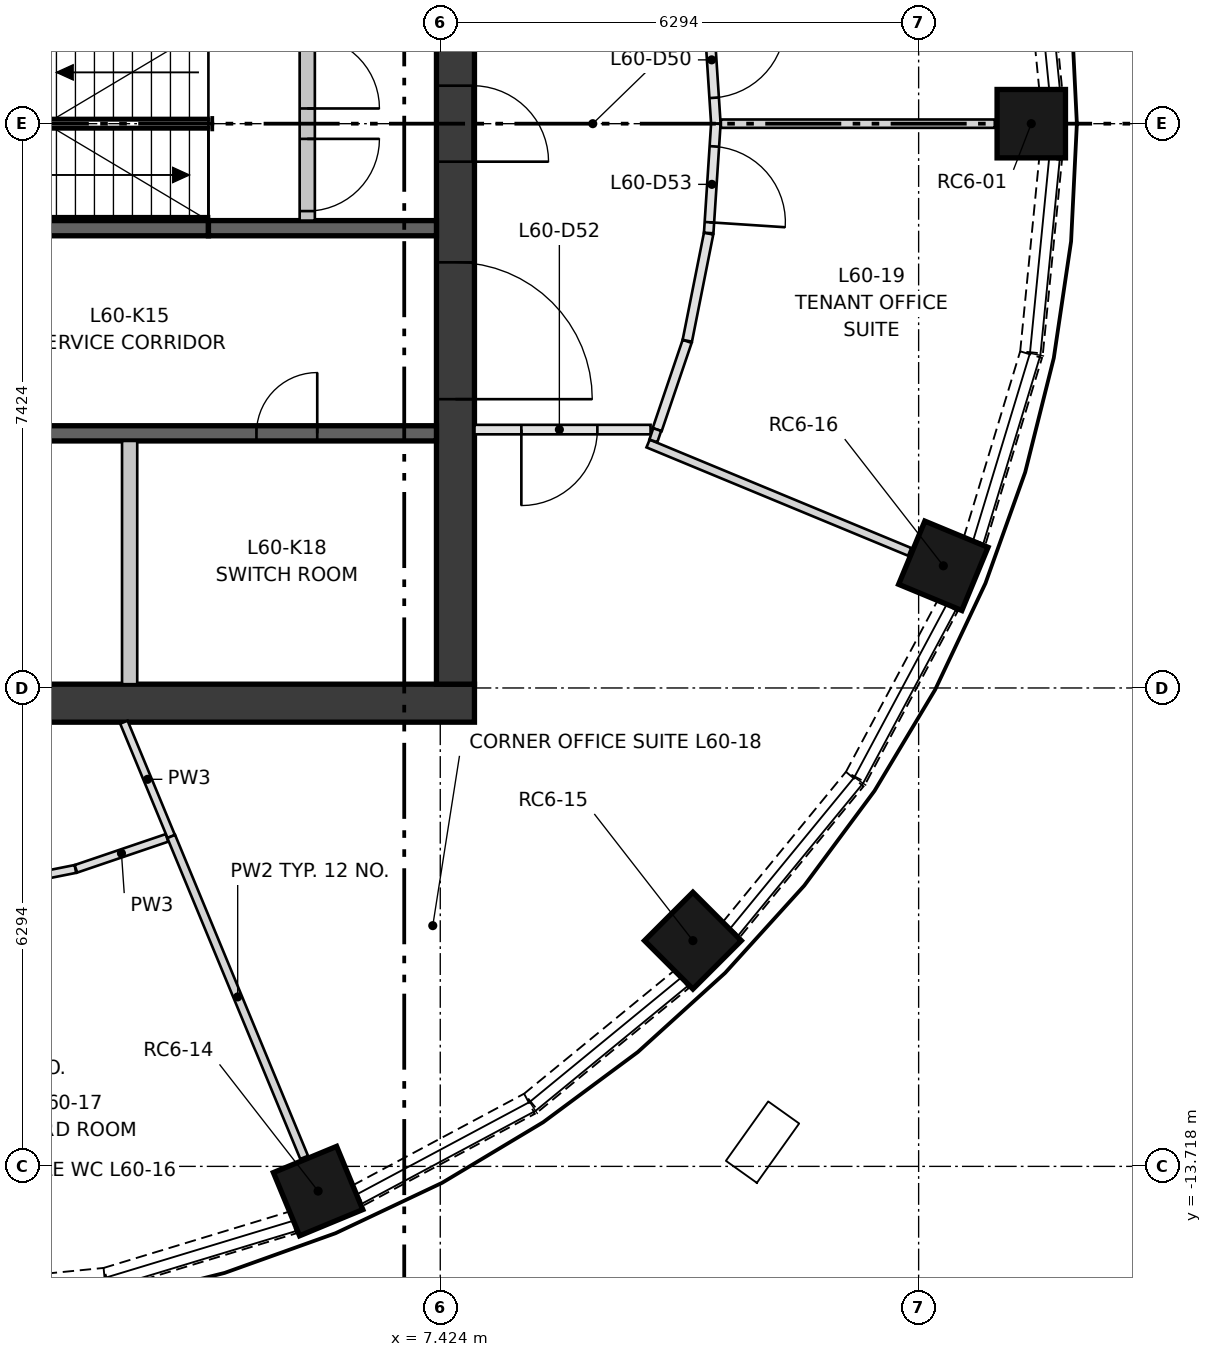
"""IFC4 building model, lengths in metres.
Left out: names, types, materials, properties, quantities, classifications, styles, units other than length and angle.
Written with IfcOpenShell. Run it as: python <this file> out.ifc"""

import sys

from ifc_helpers import new_model, si_unit, direction, frame, frame_2d, origin, origin_2d, place, context, subcontext, project, spatial, rectangle, extrude, element, fill, save


model = new_model("IFC4")
c1 = context("Model", 3, precision=1e-05, world=origin(), true_north=direction((0.0, 1.0)))
c2 = subcontext(c1, "Body", "Model", "MODEL_VIEW")
j1 = project(units=[si_unit("LENGTHUNIT", "METRE"), si_unit("PLANEANGLEUNIT", "RADIAN")], contexts=[c1])
p1 = place(None, origin())
s1 = spatial("IfcSite", under=j1, at=p1, CompositionType="ELEMENT")
p2 = place(p1, origin())
s2 = spatial("IfcBuilding", under=s1, at=p2, CompositionType="ELEMENT")
p3 = place(p2, frame((0.0, 0.0, 221.15)))
s3 = spatial("IfcBuildingStorey", under=s2, at=p3, CompositionType="ELEMENT", Elevation=221.15)
for number, where, z_axis, x_axis in (
    (1, (15.2, 0.0, 0.0), (0.0, 0.0, 1.0), (1.0, 0.0, 0.0)),
    (2, (5.817, -14.043, 0.0), (0.0, 0.0, 1.0), (0.383, -0.924, 0.0)),
    (3, (10.748, -10.748, 0.0), (0.0, 0.0, 1.0), (0.707, -0.707, 0.0)),
    (4, (14.043, -5.817, 0.0), (0.0, 0.0, 1.0), (0.924, -0.383, 0.0)),
):
    element("IfcColumn", number, at=place(p3, frame(where, z_axis=z_axis, x_axis=x_axis)), inside=s3, PredefinedType="COLUMN", context=c2, shape_type="SweptSolid", body=[
        extrude(rectangle(XDim=0.9, YDim=0.9, at=origin_2d()), origin(), (0.0, 0.0, 1.0), 2.85),
    ])
p4 = place(p3, frame((-7.874, -7.624, 0.0), z_axis=(0.0, 0.0, 1.0), x_axis=(1.0, 0.0, 0.0)))
e5 = element("IfcWall", 5, at=p4, inside=s3, PredefinedType="SHEAR", context=c2, shape_type="SweptSolid", body=[
    extrude(rectangle(XDim=15.748, YDim=0.5, at=frame_2d((7.874, 0.0))), origin(), (0.0, 0.0, 1.0), 3.35),
])
p5 = place(p3, frame((7.624, -7.374, 0.0), z_axis=(0.0, 0.0, 1.0), x_axis=(0.0, 1.0, 0.0)))
e6 = element("IfcWall", 6, at=p5, inside=s3, PredefinedType="SHEAR", context=c2, shape_type="SweptSolid", body=[
    extrude(rectangle(XDim=14.748, YDim=0.5, at=frame_2d((7.374, 0.0))), origin(), (0.0, 0.0, 1.0), 3.35),
])
p6 = place(p5, frame((6.874, 0.0, 0.0)))
e7 = element("IfcOpeningElement", 7, at=p6, cuts=e6, PredefinedType="OPENING", context=c2, shape_type="SweptSolid", body=[
    extrude(rectangle(XDim=1.0, YDim=2.1, at=frame_2d((0.5, 1.05))), frame((0.0, 0.26, 0.0), z_axis=(0.0, -1.0, 0.0), x_axis=(1.0, 0.0, 0.0)), (0.0, 0.0, 1.0), 0.52),
])
p7 = place(p5, frame((3.75, 0.0, 0.0)))
e8 = element("IfcOpeningElement", 8, at=p7, cuts=e6, PredefinedType="OPENING", context=c2, shape_type="SweptSolid", body=[
    extrude(rectangle(XDim=1.8, YDim=2.1, at=frame_2d((0.9, 1.05))), frame((0.0, 0.26, 0.0), z_axis=(0.0, -1.0, 0.0), x_axis=(1.0, 0.0, 0.0)), (0.0, 0.0, 1.0), 0.52),
])
p8 = place(p5, frame((9.198, 0.0, 0.0)))
e9 = element("IfcOpeningElement", 9, at=p8, cuts=e6, PredefinedType="OPENING", context=c2, shape_type="SweptSolid", body=[
    extrude(rectangle(XDim=1.8, YDim=2.1, at=frame_2d((0.9, 1.05))), frame((0.0, 0.26, 0.0), z_axis=(0.0, -1.0, 0.0), x_axis=(1.0, 0.0, 0.0)), (0.0, 0.0, 1.0), 0.52),
])
p9 = place(p3, frame((-7.374, -4.074, 0.0), z_axis=(0.0, 0.0, 1.0), x_axis=(1.0, 0.0, 0.0)))
e10 = element("IfcWall", 10, at=p9, inside=s3, PredefinedType="SHEAR", context=c2, shape_type="SweptSolid", body=[
    extrude(rectangle(XDim=14.748, YDim=0.2, at=frame_2d((7.374, 0.0))), origin(), (0.0, 0.0, 1.0), 3.0),
])
p10 = place(p9, frame((1.319, 0.0, 0.0)))
e11 = element("IfcOpeningElement", 11, at=p10, cuts=e10, PredefinedType="OPENING", context=c2, shape_type="SweptSolid", body=[
    extrude(rectangle(XDim=1.1, YDim=2.1, at=frame_2d((0.55, 1.05))), frame((0.0, 0.11, 0.0), z_axis=(0.0, -1.0, 0.0), x_axis=(1.0, 0.0, 0.0)), (0.0, 0.0, 1.0), 0.22),
])
p11 = place(p9, frame((4.456, 0.0, 0.0)))
e12 = element("IfcOpeningElement", 12, at=p11, cuts=e10, PredefinedType="OPENING", context=c2, shape_type="SweptSolid", body=[
    extrude(rectangle(XDim=1.1, YDim=2.1, at=frame_2d((0.55, 1.05))), frame((0.0, 0.11, 0.0), z_axis=(0.0, -1.0, 0.0), x_axis=(1.0, 0.0, 0.0)), (0.0, 0.0, 1.0), 0.22),
])
p12 = place(p9, frame((8.143, 0.0, 0.0)))
e13 = element("IfcOpeningElement", 13, at=p12, cuts=e10, PredefinedType="OPENING", context=c2, shape_type="SweptSolid", body=[
    extrude(rectangle(XDim=1.0, YDim=2.1, at=frame_2d((0.5, 1.05))), frame((0.0, 0.11, 0.0), z_axis=(0.0, -1.0, 0.0), x_axis=(1.0, 0.0, 0.0)), (0.0, 0.0, 1.0), 0.22),
])
p13 = place(p9, frame((12.379, 0.0, 0.0)))
e14 = element("IfcOpeningElement", 14, at=p13, cuts=e10, PredefinedType="OPENING", context=c2, shape_type="SweptSolid", body=[
    extrude(rectangle(XDim=0.8, YDim=2.1, at=frame_2d((0.4, 1.05))), frame((0.0, 0.11, 0.0), z_axis=(0.0, -1.0, 0.0), x_axis=(1.0, 0.0, 0.0)), (0.0, 0.0, 1.0), 0.22),
])
p14 = place(p3, frame((0.0, -1.375, 0.0), z_axis=(0.0, 0.0, 1.0), x_axis=(1.0, 0.0, 0.0)))
e15 = element("IfcWall", 15, at=p14, inside=s3, PredefinedType="SHEAR", context=c2, shape_type="SweptSolid", body=[
    extrude(rectangle(XDim=4.374, YDim=0.2, at=frame_2d((2.187, 0.0))), origin(), (0.0, 0.0, 1.0), 3.0),
])
p15 = place(p3, frame((4.374, -1.375, 0.0), z_axis=(0.0, 0.0, 1.0), x_axis=(1.0, 0.0, 0.0)))
e16 = element("IfcWall", 16, at=p15, inside=s3, PredefinedType="SHEAR", context=c2, shape_type="SweptSolid", body=[
    extrude(rectangle(XDim=3.0, YDim=0.2, at=frame_2d((1.5, 0.0))), origin(), (0.0, 0.0, 1.0), 3.0),
])
p16 = place(p3, frame((3.337, -7.374, 0.0), z_axis=(0.0, 0.0, 1.0), x_axis=(0.0, 1.0, 0.0)))
e17 = element("IfcWall", 17, at=p16, inside=s3, PredefinedType="PARTITIONING", context=c2, shape_type="SweptSolid", body=[
    extrude(rectangle(XDim=3.2, YDim=0.2, at=frame_2d((1.6, 0.0))), origin(), (0.0, 0.0, 1.0), 3.0),
])
p17 = place(p3, frame((5.674, -1.275, 0.0), z_axis=(0.0, 0.0, 1.0), x_axis=(0.0, 1.0, 0.0)))
e18 = element("IfcWall", 18, at=p17, inside=s3, PredefinedType="PARTITIONING", context=c2, shape_type="SweptSolid", body=[
    extrude(rectangle(XDim=2.55, YDim=0.2, at=frame_2d((1.275, 0.0))), origin(), (0.0, 0.0, 1.0), 3.0),
])
p18 = place(p17, frame((0.125, 0.0, 0.0)))
e19 = element("IfcOpeningElement", 19, at=p18, cuts=e18, PredefinedType="OPENING", context=c2, shape_type="SweptSolid", body=[
    extrude(rectangle(XDim=0.95, YDim=2.1, at=frame_2d((0.475, 1.05))), frame((0.0, 0.11, 0.0), z_axis=(0.0, -1.0, 0.0), x_axis=(1.0, 0.0, 0.0)), (0.0, 0.0, 1.0), 0.22),
])
p19 = place(p17, frame((1.475, 0.0, 0.0)))
e20 = element("IfcOpeningElement", 20, at=p19, cuts=e18, PredefinedType="OPENING", context=c2, shape_type="SweptSolid", body=[
    extrude(rectangle(XDim=0.95, YDim=2.1, at=frame_2d((0.475, 1.05))), frame((0.0, 0.11, 0.0), z_axis=(0.0, -1.0, 0.0), x_axis=(1.0, 0.0, 0.0)), (0.0, 0.0, 1.0), 0.22),
])
for number, where, z_axis, x_axis in (
    (21, (15.455, 0.464, 0.0), (0.0, 0.0, 1.0), (-0.098, 0.995, 0.0)),
    (22, (0.464, -15.455, 0.0), (0.0, 0.0, 1.0), (0.995, 0.098, 0.0)),
):
    element("IfcWall", number, at=place(p3, frame(where, z_axis=z_axis, x_axis=x_axis)), inside=s3, PredefinedType="SOLIDWALL", context=c2, shape_type="SweptSolid", body=[
        extrude(rectangle(XDim=2.558, YDim=0.3, at=frame_2d((1.279, 0.0))), origin(), (0.0, 0.0, 1.0), 0.9),
    ])
p20 = place(p3, frame((3.038, -15.198, 0.0), z_axis=(0.0, 0.0, 1.0), x_axis=(0.956960147557, 0.290219358397, 0.0)))
e23 = element("IfcWall", 23, at=p20, inside=s3, PredefinedType="SOLIDWALL", context=c2, shape_type="SweptSolid", body=[
    extrude(rectangle(XDim=2.557, YDim=0.3, at=frame_2d((1.279, 0.0))), origin(), (0.0, 0.0, 1.0), 0.9),
])
p21 = place(p3, frame((6.343, -14.1, 0.0), z_axis=(0.0, 0.0, 1.0), x_axis=(0.881810499649, 0.471603904468, 0.0)))
e24 = element("IfcWall", 24, at=p21, inside=s3, PredefinedType="SOLIDWALL", context=c2, shape_type="SweptSolid", body=[
    extrude(rectangle(XDim=2.557, YDim=0.3, at=frame_2d((1.278, 0.0))), origin(), (0.0, 0.0, 1.0), 0.9),
])
for number, where, z_axis, x_axis in (
    (25, (8.623, -12.877, 0.0), (0.0, 0.0, 1.0), (0.773, 0.634, 0.0)),
    (26, (11.256, -10.6, 0.0), (0.0, 0.0, 1.0), (0.634, 0.773, 0.0)),
):
    element("IfcWall", number, at=place(p3, frame(where, z_axis=z_axis, x_axis=x_axis)), inside=s3, PredefinedType="SOLIDWALL", context=c2, shape_type="SweptSolid", body=[
        extrude(rectangle(XDim=2.558, YDim=0.3, at=frame_2d((1.279, 0.0))), origin(), (0.0, 0.0, 1.0), 0.9),
    ])
p22 = place(p3, frame((12.894, -8.598, 0.0), z_axis=(0.0, 0.0, 1.0), x_axis=(0.471603904468, 0.881810499649, 0.0)))
e27 = element("IfcWall", 27, at=p22, inside=s3, PredefinedType="SOLIDWALL", context=c2, shape_type="SweptSolid", body=[
    extrude(rectangle(XDim=2.557, YDim=0.3, at=frame_2d((1.278, 0.0))), origin(), (0.0, 0.0, 1.0), 0.9),
])
p23 = place(p3, frame((14.455, -5.486, 0.0), z_axis=(0.0, 0.0, 1.0), x_axis=(0.290219358397, 0.956960147557, 0.0)))
e28 = element("IfcWall", 28, at=p23, inside=s3, PredefinedType="SOLIDWALL", context=c2, shape_type="SweptSolid", body=[
    extrude(rectangle(XDim=2.557, YDim=0.3, at=frame_2d((1.279, 0.0))), origin(), (0.0, 0.0, 1.0), 0.9),
])
p24 = place(p3, frame((15.204, -3.009, 0.0), z_axis=(0.0, 0.0, 1.0), x_axis=(0.09813315545, 0.995173293352, 0.0)))
e29 = element("IfcWall", 29, at=p24, inside=s3, PredefinedType="SOLIDWALL", context=c2, shape_type="SweptSolid", body=[
    extrude(rectangle(XDim=2.558, YDim=0.3, at=frame_2d((1.279, 0.0))), origin(), (0.0, 0.0, 1.0), 0.9),
])
p25 = place(p3, frame((10.956, 1.438, 0.0), z_axis=(0.0, 0.0, 1.0), x_axis=(0.065383473363, -0.997860211358, 0.0)))
e30 = element("IfcWall", 30, at=p25, inside=s3, PredefinedType="PARTITIONING", context=c2, shape_type="SweptSolid", body=[
    extrude(rectangle(XDim=1.441, YDim=0.125, at=frame_2d((0.721, 0.0))), origin(), (0.0, 0.0, 1.0), 3.0),
])
p26 = place(p25, frame((0.1, 0.0, 0.0)))
e31 = element("IfcOpeningElement", 31, at=p26, cuts=e30, PredefinedType="OPENING", context=c2, shape_type="SweptSolid", body=[
    extrude(rectangle(XDim=1.0, YDim=2.1, at=frame_2d((0.5, 1.05))), frame((0.0, 0.073, 0.0), z_axis=(0.0, -1.0, 0.0), x_axis=(1.0, 0.0, 0.0)), (0.0, 0.0, 1.0), 0.145),
])
p27 = place(p3, frame((10.191, -4.024, 0.0), z_axis=(0.0, 0.0, 1.0), x_axis=(-1.0, 0.0, 0.0)))
e32 = element("IfcWall", 32, at=p27, inside=s3, PredefinedType="PARTITIONING", context=c2, shape_type="SweptSolid", body=[
    extrude(rectangle(XDim=2.317, YDim=0.125, at=frame_2d((1.158, 0.0))), origin(), (0.0, 0.0, 1.0), 3.0),
])
p28 = place(p27, frame((0.7, 0.0, 0.0)))
e33 = element("IfcOpeningElement", 33, at=p28, cuts=e32, PredefinedType="OPENING", context=c2, shape_type="SweptSolid", body=[
    extrude(rectangle(XDim=1.0, YDim=2.1, at=frame_2d((0.5, 1.05))), frame((0.0, 0.073, 0.0), z_axis=(0.0, -1.0, 0.0), x_axis=(1.0, 0.0, 0.0)), (0.0, 0.0, 1.0), 0.145),
])
p29 = place(p3, frame((10.672, -2.864, 0.0), z_axis=(0.0, 0.0, 1.0), x_axis=(-0.321363343769, -0.946955965862, 0.0)))
e34 = element("IfcWall", 34, at=p29, inside=s3, PredefinedType="PARTITIONING", context=c2, shape_type="SweptSolid", body=[
    extrude(rectangle(XDim=1.225, YDim=0.125, at=frame_2d((0.613, 0.0))), origin(), (0.0, 0.0, 1.0), 3.0),
])
p30 = place(p3, frame((10.955, -1.446, 0.0), z_axis=(0.0, 0.0, 1.0), x_axis=(-0.195005351681, -0.980802178228, 0.0)))
e35 = element("IfcWall", 35, at=p30, inside=s3, PredefinedType="PARTITIONING", context=c2, shape_type="SweptSolid", body=[
    extrude(rectangle(XDim=1.437, YDim=0.125, at=frame_2d((0.719, 0.0))), origin(), (0.0, 0.0, 1.0), 3.0),
])
p31 = place(p3, frame((11.05, 0.0, 0.0), z_axis=(0.0, 0.0, 1.0), x_axis=(-0.065383473363, -0.997860211358, 0.0)))
e36 = element("IfcWall", 36, at=p31, inside=s3, PredefinedType="PARTITIONING", context=c2, shape_type="SweptSolid", body=[
    extrude(rectangle(XDim=1.441, YDim=0.125, at=frame_2d((0.721, 0.0))), origin(), (0.0, 0.0, 1.0), 3.0),
])
p32 = place(p31, frame((0.3, 0.0, 0.0)))
e37 = element("IfcOpeningElement", 37, at=p32, cuts=e36, PredefinedType="OPENING", context=c2, shape_type="SweptSolid", body=[
    extrude(rectangle(XDim=1.0, YDim=2.1, at=frame_2d((0.5, 1.05))), frame((0.0, 0.073, 0.0), z_axis=(0.0, -1.0, 0.0), x_axis=(1.0, 0.0, 0.0)), (0.0, 0.0, 1.0), 0.145),
])
p33 = place(p3, frame((14.72, 0.0, 0.0), z_axis=(0.0, 0.0, 1.0), x_axis=(-1.0, 0.0, 0.0)))
e38 = element("IfcWall", 38, at=p33, inside=s3, PredefinedType="PARTITIONING", context=c2, shape_type="SweptSolid", body=[
    extrude(rectangle(XDim=3.604, YDim=0.11, at=frame_2d((1.802, 0.0))), origin(), (0.0, 0.0, 1.0), 3.0),
])
p34 = place(p3, frame((2.624, -9.805, 0.0), z_axis=(0.0, 0.0, 1.0), x_axis=(-0.980765080918, -0.195191844223, 0.0)))
e39 = element("IfcWall", 39, at=p34, inside=s3, PredefinedType="PARTITIONING", context=c2, shape_type="SweptSolid", body=[
    extrude(rectangle(XDim=1.321, YDim=0.105, at=frame_2d((0.66, 0.0))), origin(), (0.0, 0.0, 1.0), 3.0),
])
p35 = place(p3, frame((3.829, -9.396, 0.0), z_axis=(0.0, 0.0, 1.0), x_axis=(-0.946932566751, -0.321432285291, 0.0)))
e40 = element("IfcWall", 40, at=p35, inside=s3, PredefinedType="PARTITIONING", context=c2, shape_type="SweptSolid", body=[
    extrude(rectangle(XDim=1.265, YDim=0.105, at=frame_2d((0.633, 0.0))), origin(), (0.0, 0.0, 1.0), 3.0),
])
p36 = place(p3, frame((3.261, -7.874, 0.0), z_axis=(0.0, 0.0, 1.0), x_axis=(0.382718376354, -0.923865057463, 0.0)))
e41 = element("IfcWall", 41, at=p36, inside=s3, PredefinedType="PARTITIONING", context=c2, shape_type="SweptSolid", body=[
    extrude(rectangle(XDim=1.627, YDim=0.105, at=frame_2d((0.813, 0.0))), origin(), (0.0, 0.0, 1.0), 3.0),
])
p37 = place(p3, frame((3.884, -9.377, 0.0), z_axis=(0.0, 0.0, 1.0), x_axis=(0.382664766489, -0.923887263949, 0.0)))
e42 = element("IfcWall", 42, at=p37, inside=s3, PredefinedType="PARTITIONING", context=c2, shape_type="SweptSolid", body=[
    extrude(rectangle(XDim=4.57, YDim=0.11, at=frame_2d((2.285, 0.0))), origin(), (0.0, 0.0, 1.0), 3.0),
])
p38 = place(p3, frame((10.158, -4.208, 0.0), z_axis=(0.0, 0.0, 1.0), x_axis=(0.923897012701, -0.382641228728, 0.0)))
e43 = element("IfcWall", 43, at=p38, inside=s3, PredefinedType="PARTITIONING", context=c2, shape_type="SweptSolid", body=[
    extrude(rectangle(XDim=3.725, YDim=0.11, at=frame_2d((1.862, 0.0))), origin(), (0.0, 0.0, 1.0), 3.0),
])
p39 = place(p3, frame((10.278, -4.024, 0.0), z_axis=(0.0, 0.0, 1.0), x_axis=(-0.321819116975, -0.94680117023, 0.0)))
e44 = element("IfcWall", 44, at=p39, inside=s3, PredefinedType="PARTITIONING", context=c2, shape_type="SweptSolid", body=[
    extrude(rectangle(XDim=0.157, YDim=0.11, at=frame_2d((0.079, 0.0))), origin(), (0.0, 0.0, 1.0), 3.0),
])
p40 = place(p18, frame((0.95, 0.0, 0.0), z_axis=(0.0, 0.0, 1.0), x_axis=(-1.0, 0.0, 0.0)))
e45 = element("IfcDoor", 45, at=p40, inside=s3, OperationType="SINGLE_SWING_RIGHT", PredefinedType="DOOR", context=c2, shape_type="SweptSolid", body=[
    extrude(rectangle(XDim=0.95, YDim=2.1, at=frame_2d((0.475, 1.05))), frame((0.0, 0.025, 0.0), z_axis=(0.0, -1.0, 0.0), x_axis=(1.0, 0.0, 0.0)), (0.0, 0.0, 1.0), 0.05),
])
fill(e19, e45)
p41 = place(p19, frame((0.95, 0.0, 0.0), z_axis=(0.0, 0.0, 1.0), x_axis=(-1.0, 0.0, 0.0)))
e46 = element("IfcDoor", 46, at=p41, inside=s3, OperationType="SINGLE_SWING_LEFT", PredefinedType="DOOR", context=c2, shape_type="SweptSolid", body=[
    extrude(rectangle(XDim=0.95, YDim=2.1, at=frame_2d((0.475, 1.05))), frame((0.0, 0.025, 0.0), z_axis=(0.0, -1.0, 0.0), x_axis=(1.0, 0.0, 0.0)), (0.0, 0.0, 1.0), 0.05),
])
fill(e20, e46)
p42 = place(p13, origin())
e47 = element("IfcDoor", 47, at=p42, inside=s3, OperationType="SINGLE_SWING_RIGHT", PredefinedType="DOOR", context=c2, shape_type="SweptSolid", body=[
    extrude(rectangle(XDim=0.8, YDim=2.1, at=frame_2d((0.4, 1.05))), frame((0.0, 0.025, 0.0), z_axis=(0.0, -1.0, 0.0), x_axis=(1.0, 0.0, 0.0)), (0.0, 0.0, 1.0), 0.05),
])
fill(e14, e47)
p43 = place(p6, frame((1.0, 0.0, 0.0), z_axis=(0.0, 0.0, 1.0), x_axis=(-1.0, 0.0, 0.0)))
e48 = element("IfcDoor", 48, at=p43, inside=s3, OperationType="SINGLE_SWING_LEFT", PredefinedType="DOOR", context=c2, shape_type="SweptSolid", body=[
    extrude(rectangle(XDim=1.0, YDim=2.1, at=frame_2d((0.5, 1.05))), frame((0.0, 0.25, 0.0), z_axis=(0.0, -1.0, 0.0), x_axis=(1.0, 0.0, 0.0)), (0.0, 0.0, 1.0), 0.05),
])
fill(e7, e48)
p44 = place(p7, frame((1.8, 0.0, 0.0), z_axis=(0.0, 0.0, 1.0), x_axis=(-1.0, 0.0, 0.0)))
e49 = element("IfcDoor", 49, at=p44, inside=s3, OperationType="DOUBLE_DOOR_SINGLE_SWING", PredefinedType="DOOR", context=c2, shape_type="SweptSolid", body=[
    extrude(rectangle(XDim=1.8, YDim=2.1, at=frame_2d((0.9, 1.05))), frame((0.0, 0.025, 0.0), z_axis=(0.0, -1.0, 0.0), x_axis=(1.0, 0.0, 0.0)), (0.0, 0.0, 1.0), 0.05),
])
fill(e8, e49)
p45 = place(p26, origin())
e50 = element("IfcDoor", 50, at=p45, inside=s3, OperationType="SINGLE_SWING_LEFT", PredefinedType="DOOR", context=c2, shape_type="SweptSolid", body=[
    extrude(rectangle(XDim=1.0, YDim=2.1, at=frame_2d((0.5, 1.05))), frame((0.0, 0.025, 0.0), z_axis=(0.0, -1.0, 0.0), x_axis=(1.0, 0.0, 0.0)), (0.0, 0.0, 1.0), 0.05),
])
fill(e31, e50)
p46 = place(p28, origin())
e51 = element("IfcDoor", 51, at=p46, inside=s3, OperationType="SINGLE_SWING_RIGHT", PredefinedType="DOOR", context=c2, shape_type="SweptSolid", body=[
    extrude(rectangle(XDim=1.0, YDim=2.1, at=frame_2d((0.5, 1.05))), frame((0.0, 0.025, 0.0), z_axis=(0.0, -1.0, 0.0), x_axis=(1.0, 0.0, 0.0)), (0.0, 0.0, 1.0), 0.05),
])
fill(e33, e51)
p47 = place(p32, origin())
e52 = element("IfcDoor", 52, at=p47, inside=s3, OperationType="SINGLE_SWING_RIGHT", PredefinedType="DOOR", context=c2, shape_type="SweptSolid", body=[
    extrude(rectangle(XDim=1.0, YDim=2.1, at=frame_2d((0.5, 1.05))), frame((0.0, 0.025, 0.0), z_axis=(0.0, -1.0, 0.0), x_axis=(1.0, 0.0, 0.0)), (0.0, 0.0, 1.0), 0.05),
])
fill(e37, e52)
save(model, sys.argv[1])
